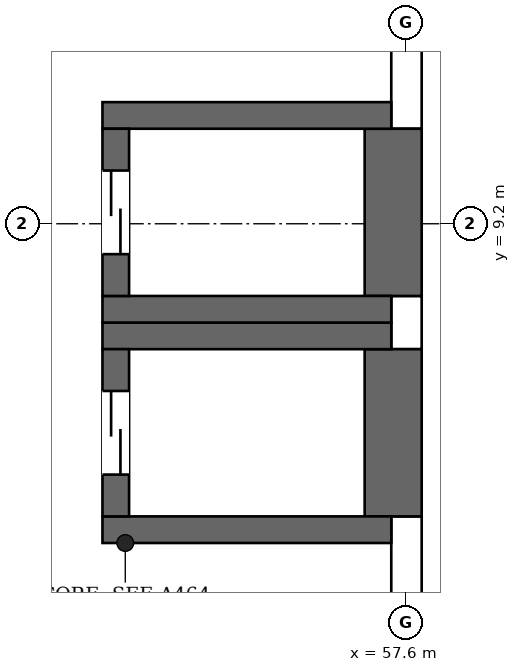
"""IFC4 building model, lengths in metres.
Left out: names, types, materials, properties, quantities, classifications, styles, units other than length and angle.
Written with IfcOpenShell. Run it as: python <this file> out.ifc"""

import sys

from ifc_helpers import new_model, si_unit, direction, frame, frame_2d, origin, place, context, subcontext, project, spatial, rectangle, extrude, element, fill, save


model = new_model("IFC4")
c1 = context("Model", 3, precision=1e-05, world=origin(), true_north=direction((0.0, 1.0)))
c2 = subcontext(c1, "Body", "Model", "MODEL_VIEW")
j1 = project(units=[si_unit("LENGTHUNIT", "METRE"), si_unit("PLANEANGLEUNIT", "RADIAN")], contexts=[c1])
p1 = place(None, origin())
s1 = spatial("IfcSite", under=j1, at=p1, CompositionType="ELEMENT")
p2 = place(p1, origin())
s2 = spatial("IfcBuilding", under=s1, at=p2, CompositionType="ELEMENT")
p3 = place(p2, frame((0.0, 0.0, 31.9)))
s3 = spatial("IfcBuildingStorey", under=s2, at=p3, CompositionType="ELEMENT", Elevation=31.9)
for number, where, z_axis, x_axis in (
    (1, (53.6, 5.175, 0.0), (0.0, 0.0, 1.0), (1.0, 0.0, 0.0)),
    (2, (53.6, 7.725, 0.0), (0.0, 0.0, 1.0), (1.0, 0.0, 0.0)),
):
    element("IfcWall", number, at=place(p3, frame(where, z_axis=z_axis, x_axis=x_axis)), inside=s3, PredefinedType="SHEAR", context=c2, shape_type="SweptSolid", body=[
        extrude(rectangle(XDim=3.8, YDim=0.35, at=frame_2d((1.9, 0.0))), origin(), (0.0, 0.0, 1.0), 4.2),
    ])
p4 = place(p3, frame((53.775, 5.35, 0.0), z_axis=(0.0, 0.0, 1.0), x_axis=(0.0, 1.0, 0.0)))
e3 = element("IfcWall", 3, at=p4, inside=s3, PredefinedType="SHEAR", context=c2, shape_type="SweptSolid", body=[
    extrude(rectangle(XDim=2.2, YDim=0.35, at=frame_2d((1.1, 0.0))), origin(), (0.0, 0.0, 1.0), 4.2),
])
p5 = place(p4, frame((0.55, 0.0, 0.0)))
e4 = element("IfcOpeningElement", 4, at=p5, cuts=e3, PredefinedType="OPENING", context=c2, shape_type="SweptSolid", body=[
    extrude(rectangle(XDim=1.1, YDim=2.1, at=frame_2d((0.55, 1.05))), frame((0.0, 0.185, 0.0), z_axis=(0.0, -1.0, 0.0), x_axis=(1.0, 0.0, 0.0)), (0.0, 0.0, 1.0), 0.37),
])
p6 = place(p3, frame((57.425, 5.35, 0.0), z_axis=(0.0, 0.0, 1.0), x_axis=(0.0, 1.0, 0.0)))
e5 = element("IfcWall", 5, at=p6, inside=s3, PredefinedType="SHEAR", context=c2, shape_type="SweptSolid", body=[
    extrude(rectangle(XDim=2.2, YDim=0.75, at=frame_2d((1.1, 0.0))), origin(), (0.0, 0.0, 1.0), 4.2),
])
for number, where, z_axis, x_axis in (
    (6, (53.6, 8.075, 0.0), (0.0, 0.0, 1.0), (1.0, 0.0, 0.0)),
    (7, (53.6, 10.625, 0.0), (0.0, 0.0, 1.0), (1.0, 0.0, 0.0)),
):
    element("IfcWall", number, at=place(p3, frame(where, z_axis=z_axis, x_axis=x_axis)), inside=s3, PredefinedType="SHEAR", context=c2, shape_type="SweptSolid", body=[
        extrude(rectangle(XDim=3.8, YDim=0.35, at=frame_2d((1.9, 0.0))), origin(), (0.0, 0.0, 1.0), 4.2),
    ])
p7 = place(p3, frame((53.775, 8.25, 0.0), z_axis=(0.0, 0.0, 1.0), x_axis=(0.0, 1.0, 0.0)))
e8 = element("IfcWall", 8, at=p7, inside=s3, PredefinedType="SHEAR", context=c2, shape_type="SweptSolid", body=[
    extrude(rectangle(XDim=2.2, YDim=0.35, at=frame_2d((1.1, 0.0))), origin(), (0.0, 0.0, 1.0), 4.2),
])
p8 = place(p7, frame((0.55, 0.0, 0.0)))
e9 = element("IfcOpeningElement", 9, at=p8, cuts=e8, PredefinedType="OPENING", context=c2, shape_type="SweptSolid", body=[
    extrude(rectangle(XDim=1.1, YDim=2.1, at=frame_2d((0.55, 1.05))), frame((0.0, 0.185, 0.0), z_axis=(0.0, -1.0, 0.0), x_axis=(1.0, 0.0, 0.0)), (0.0, 0.0, 1.0), 0.37),
])
p9 = place(p3, frame((57.425, 8.25, 0.0), z_axis=(0.0, 0.0, 1.0), x_axis=(0.0, 1.0, 0.0)))
e10 = element("IfcWall", 10, at=p9, inside=s3, PredefinedType="SHEAR", context=c2, shape_type="SweptSolid", body=[
    extrude(rectangle(XDim=2.2, YDim=0.75, at=frame_2d((1.1, 0.0))), origin(), (0.0, 0.0, 1.0), 4.2),
])
p10 = place(p3, frame((57.6, -0.2, 0.0), z_axis=(0.0, 0.0, 1.0), x_axis=(0.0, 1.0, 0.0)))
e11 = element("IfcWall", 11, at=p10, inside=s3, PredefinedType="PARAPET", context=c2, shape_type="SweptSolid", body=[
    extrude(rectangle(XDim=5.55, YDim=0.4, at=frame_2d((2.775, 0.0))), origin(), (0.0, 0.0, 1.0), 1.1),
])
p11 = place(p3, frame((57.6, 7.55, 0.0), z_axis=(0.0, 0.0, 1.0), x_axis=(0.0, 1.0, 0.0)))
e12 = element("IfcWall", 12, at=p11, inside=s3, PredefinedType="PARAPET", context=c2, shape_type="SweptSolid", body=[
    extrude(rectangle(XDim=0.7, YDim=0.4, at=frame_2d((0.35, 0.0))), origin(), (0.0, 0.0, 1.0), 1.1),
])
p12 = place(p3, frame((57.6, 10.45, 0.0), z_axis=(0.0, 0.0, 1.0), x_axis=(0.0, 1.0, 0.0)))
e13 = element("IfcWall", 13, at=p12, inside=s3, PredefinedType="PARAPET", context=c2, shape_type="SweptSolid", body=[
    extrude(rectangle(XDim=11.3, YDim=0.4, at=frame_2d((5.65, 0.0))), origin(), (0.0, 0.0, 1.0), 1.1),
])
p13 = place(p5, origin())
e14 = element("IfcDoor", 14, at=p13, inside=s3, OperationType="DOUBLE_DOOR_SLIDING", PredefinedType="DOOR", context=c2, shape_type="SweptSolid", body=[
    extrude(rectangle(XDim=1.1, YDim=2.1, at=frame_2d((0.55, 1.05))), frame((0.0, 0.025, 0.0), z_axis=(0.0, -1.0, 0.0), x_axis=(1.0, 0.0, 0.0)), (0.0, 0.0, 1.0), 0.05),
])
fill(e4, e14)
p14 = place(p8, origin())
e15 = element("IfcDoor", 15, at=p14, inside=s3, OperationType="DOUBLE_DOOR_SLIDING", PredefinedType="DOOR", context=c2, shape_type="SweptSolid", body=[
    extrude(rectangle(XDim=1.1, YDim=2.1, at=frame_2d((0.55, 1.05))), frame((0.0, 0.025, 0.0), z_axis=(0.0, -1.0, 0.0), x_axis=(1.0, 0.0, 0.0)), (0.0, 0.0, 1.0), 0.05),
])
fill(e9, e15)
save(model, sys.argv[1])
